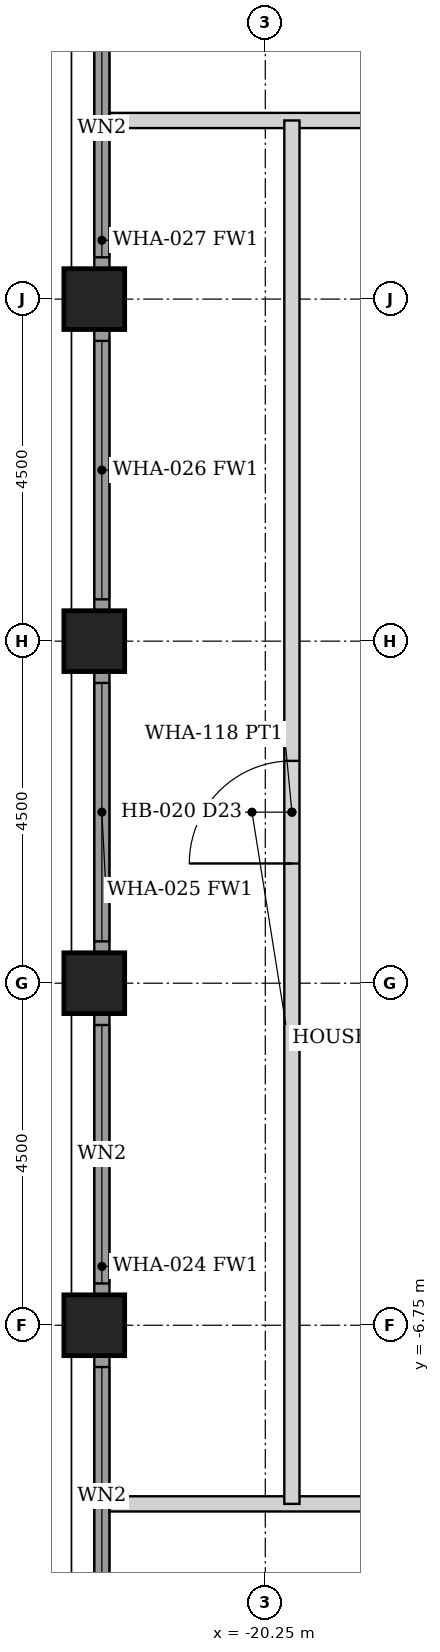
"""IFC4 building model, lengths in metres.
Left out: names, types, materials, properties, quantities, classifications, styles, units other than length and angle.
Written with IfcOpenShell. Run it as: python <this file> out.ifc"""

import sys

from ifc_helpers import new_model, si_unit, direction, frame, frame_2d, origin, origin_2d, place, context, subcontext, project, spatial, rectangle, hollow_rectangle, extrude, element, fill, save


model = new_model("IFC4")
c1 = context("Model", 3, precision=1e-05, world=origin(), true_north=direction((0.0, 1.0)))
c2 = subcontext(c1, "Body", "Model", "MODEL_VIEW")
j1 = project(units=[si_unit("LENGTHUNIT", "METRE"), si_unit("PLANEANGLEUNIT", "RADIAN")], contexts=[c1])
p1 = place(None, origin())
s1 = spatial("IfcSite", under=j1, at=p1, CompositionType="ELEMENT")
p2 = place(p1, origin())
s2 = spatial("IfcBuilding", under=s1, at=p2, CompositionType="ELEMENT")
p3 = place(p2, frame((0.0, 0.0, 129.2)))
s3 = spatial("IfcBuildingStorey", under=s2, at=p3, CompositionType="ELEMENT", Elevation=129.2)
for number, where, z_axis, x_axis in (
    (1, (-22.5, -6.75, 0.0), (0.0, 0.0, 1.0), (1.0, 0.0, 0.0)),
    (2, (-22.5, -2.25, 0.0), (0.0, 0.0, 1.0), (1.0, 0.0, 0.0)),
    (3, (-22.5, 2.25, 0.0), (0.0, 0.0, 1.0), (1.0, 0.0, 0.0)),
    (4, (-22.5, 6.75, 0.0), (0.0, 0.0, 1.0), (1.0, 0.0, 0.0)),
):
    element("IfcColumn", number, at=place(p3, frame(where, z_axis=z_axis, x_axis=x_axis)), inside=s3, PredefinedType="COLUMN", context=c2, shape_type="SweptSolid", body=[
        extrude(hollow_rectangle(XDim=0.8, YDim=0.8, WallThickness=0.06, at=origin_2d()), origin(), (0.0, 0.0, 1.0), 3.6),
    ])
p4 = place(p3, frame((-22.4, -10.845, 0.0), z_axis=(0.0, 0.0, 1.0), x_axis=(0.0, 1.0, 0.0)))
e5 = element("IfcWall", 5, at=p4, inside=s3, PredefinedType="SOLIDWALL", context=c2, shape_type="SweptSolid", body=[
    extrude(rectangle(XDim=3.69, YDim=0.2, at=frame_2d((1.845, 0.0))), origin(), (0.0, 0.0, 1.0), 2.479),
])
p5 = place(p4, frame((0.145, 0.0, 0.3)))
e6 = element("IfcOpeningElement", 6, at=p5, cuts=e5, PredefinedType="OPENING", context=c2, shape_type="SweptSolid", body=[
    extrude(rectangle(XDim=3.4, YDim=2.029, at=frame_2d((1.7, 1.015))), frame((0.0, 0.11, 0.0), z_axis=(0.0, -1.0, 0.0), x_axis=(1.0, 0.0, 0.0)), (0.0, 0.0, 1.0), 0.22),
])
p6 = place(p3, frame((-22.4, -6.345, 0.0), z_axis=(0.0, 0.0, 1.0), x_axis=(0.0, 1.0, 0.0)))
e7 = element("IfcWall", 7, at=p6, inside=s3, PredefinedType="SOLIDWALL", context=c2, shape_type="SweptSolid", body=[
    extrude(rectangle(XDim=3.69, YDim=0.2, at=frame_2d((1.845, 0.0))), origin(), (0.0, 0.0, 1.0), 2.479),
])
p7 = place(p6, frame((0.145, 0.0, 0.3)))
e8 = element("IfcOpeningElement", 8, at=p7, cuts=e7, PredefinedType="OPENING", context=c2, shape_type="SweptSolid", body=[
    extrude(rectangle(XDim=3.4, YDim=2.029, at=frame_2d((1.7, 1.015))), frame((0.0, 0.11, 0.0), z_axis=(0.0, -1.0, 0.0), x_axis=(1.0, 0.0, 0.0)), (0.0, 0.0, 1.0), 0.22),
])
p8 = place(p3, frame((-22.4, -1.845, 0.0), z_axis=(0.0, 0.0, 1.0), x_axis=(0.0, 1.0, 0.0)))
e9 = element("IfcWall", 9, at=p8, inside=s3, PredefinedType="SOLIDWALL", context=c2, shape_type="SweptSolid", body=[
    extrude(rectangle(XDim=3.69, YDim=0.2, at=frame_2d((1.845, 0.0))), origin(), (0.0, 0.0, 1.0), 2.479),
])
p9 = place(p8, frame((0.145, 0.0, 0.3)))
e10 = element("IfcOpeningElement", 10, at=p9, cuts=e9, PredefinedType="OPENING", context=c2, shape_type="SweptSolid", body=[
    extrude(rectangle(XDim=3.4, YDim=2.029, at=frame_2d((1.7, 1.015))), frame((0.0, 0.11, 0.0), z_axis=(0.0, -1.0, 0.0), x_axis=(1.0, 0.0, 0.0)), (0.0, 0.0, 1.0), 0.22),
])
p10 = place(p3, frame((-22.4, 2.655, 0.0), z_axis=(0.0, 0.0, 1.0), x_axis=(0.0, 1.0, 0.0)))
e11 = element("IfcWall", 11, at=p10, inside=s3, PredefinedType="SOLIDWALL", context=c2, shape_type="SweptSolid", body=[
    extrude(rectangle(XDim=3.69, YDim=0.2, at=frame_2d((1.845, 0.0))), origin(), (0.0, 0.0, 1.0), 2.479),
])
p11 = place(p10, frame((0.145, 0.0, 0.3)))
e12 = element("IfcOpeningElement", 12, at=p11, cuts=e11, PredefinedType="OPENING", context=c2, shape_type="SweptSolid", body=[
    extrude(rectangle(XDim=3.4, YDim=2.029, at=frame_2d((1.7, 1.015))), frame((0.0, 0.11, 0.0), z_axis=(0.0, -1.0, 0.0), x_axis=(1.0, 0.0, 0.0)), (0.0, 0.0, 1.0), 0.22),
])
p12 = place(p3, frame((-22.4, 7.155, 0.0), z_axis=(0.0, 0.0, 1.0), x_axis=(0.0, 1.0, 0.0)))
e13 = element("IfcWall", 13, at=p12, inside=s3, PredefinedType="SOLIDWALL", context=c2, shape_type="SweptSolid", body=[
    extrude(rectangle(XDim=3.69, YDim=0.2, at=frame_2d((1.845, 0.0))), origin(), (0.0, 0.0, 1.0), 2.479),
])
p13 = place(p12, frame((0.145, 0.0, 0.3)))
e14 = element("IfcOpeningElement", 14, at=p13, cuts=e13, PredefinedType="OPENING", context=c2, shape_type="SweptSolid", body=[
    extrude(rectangle(XDim=3.4, YDim=2.029, at=frame_2d((1.7, 1.015))), frame((0.0, 0.11, 0.0), z_axis=(0.0, -1.0, 0.0), x_axis=(1.0, 0.0, 0.0)), (0.0, 0.0, 1.0), 0.22),
])
p14 = place(p3, frame((-22.3, 9.1, 0.0), z_axis=(0.0, 0.0, 1.0), x_axis=(1.0, 0.0, 0.0)))
e15 = element("IfcWall", 15, at=p14, inside=s3, PredefinedType="PARTITIONING", context=c2, shape_type="SweptSolid", body=[
    extrude(rectangle(XDim=44.6, YDim=0.2, at=frame_2d((22.3, 0.0))), origin(), (0.0, 0.0, 1.0), 2.473),
])
p15 = place(p14, frame((6.75, 0.0, 0.0)))
e16 = element("IfcOpeningElement", 16, at=p15, cuts=e15, PredefinedType="OPENING", context=c2, shape_type="SweptSolid", body=[
    extrude(rectangle(XDim=0.9, YDim=2.1, at=frame_2d((0.45, 1.05))), frame((0.0, 0.11, 0.0), z_axis=(0.0, -1.0, 0.0), x_axis=(1.0, 0.0, 0.0)), (0.0, 0.0, 1.0), 0.22),
])
p16 = place(p14, frame((14.45, 0.0, 0.0)))
e17 = element("IfcOpeningElement", 17, at=p16, cuts=e15, PredefinedType="OPENING", context=c2, shape_type="SweptSolid", body=[
    extrude(rectangle(XDim=0.9, YDim=2.1, at=frame_2d((0.45, 1.05))), frame((0.0, 0.11, 0.0), z_axis=(0.0, -1.0, 0.0), x_axis=(1.0, 0.0, 0.0)), (0.0, 0.0, 1.0), 0.22),
])
p17 = place(p14, frame((15.75, 0.0, 0.0)))
e18 = element("IfcOpeningElement", 18, at=p17, cuts=e15, PredefinedType="OPENING", context=c2, shape_type="SweptSolid", body=[
    extrude(rectangle(XDim=0.9, YDim=2.1, at=frame_2d((0.45, 1.05))), frame((0.0, 0.11, 0.0), z_axis=(0.0, -1.0, 0.0), x_axis=(1.0, 0.0, 0.0)), (0.0, 0.0, 1.0), 0.22),
])
p18 = place(p14, frame((32.45, 0.0, 0.0)))
e19 = element("IfcOpeningElement", 19, at=p18, cuts=e15, PredefinedType="OPENING", context=c2, shape_type="SweptSolid", body=[
    extrude(rectangle(XDim=0.9, YDim=2.1, at=frame_2d((0.45, 1.05))), frame((0.0, 0.11, 0.0), z_axis=(0.0, -1.0, 0.0), x_axis=(1.0, 0.0, 0.0)), (0.0, 0.0, 1.0), 0.22),
])
p19 = place(p14, frame((33.75, 0.0, 0.0)))
e20 = element("IfcOpeningElement", 20, at=p19, cuts=e15, PredefinedType="OPENING", context=c2, shape_type="SweptSolid", body=[
    extrude(rectangle(XDim=0.9, YDim=2.1, at=frame_2d((0.45, 1.05))), frame((0.0, 0.11, 0.0), z_axis=(0.0, -1.0, 0.0), x_axis=(1.0, 0.0, 0.0)), (0.0, 0.0, 1.0), 0.22),
])
p20 = place(p14, frame((38.85, 0.0, 0.0)))
e21 = element("IfcOpeningElement", 21, at=p20, cuts=e15, PredefinedType="OPENING", context=c2, shape_type="SweptSolid", body=[
    extrude(rectangle(XDim=0.9, YDim=2.1, at=frame_2d((0.45, 1.05))), frame((0.0, 0.11, 0.0), z_axis=(0.0, -1.0, 0.0), x_axis=(1.0, 0.0, 0.0)), (0.0, 0.0, 1.0), 0.22),
])
p21 = place(p14, frame((4.85, 0.0, 0.0)))
e22 = element("IfcOpeningElement", 22, at=p21, cuts=e15, PredefinedType="OPENING", context=c2, shape_type="SweptSolid", body=[
    extrude(rectangle(XDim=0.9, YDim=2.1, at=frame_2d((0.45, 1.05))), frame((0.0, 0.11, 0.0), z_axis=(0.0, -1.0, 0.0), x_axis=(1.0, 0.0, 0.0)), (0.0, 0.0, 1.0), 0.22),
])
p22 = place(p3, frame((-22.3, -9.1, 0.0), z_axis=(0.0, 0.0, 1.0), x_axis=(1.0, 0.0, 0.0)))
e23 = element("IfcWall", 23, at=p22, inside=s3, PredefinedType="PARTITIONING", context=c2, shape_type="SweptSolid", body=[
    extrude(rectangle(XDim=44.6, YDim=0.2, at=frame_2d((22.3, 0.0))), origin(), (0.0, 0.0, 1.0), 2.473),
])
p23 = place(p22, frame((9.95, 0.0, 0.0)))
e24 = element("IfcOpeningElement", 24, at=p23, cuts=e23, PredefinedType="OPENING", context=c2, shape_type="SweptSolid", body=[
    extrude(rectangle(XDim=0.9, YDim=2.1, at=frame_2d((0.45, 1.05))), frame((0.0, 0.11, 0.0), z_axis=(0.0, -1.0, 0.0), x_axis=(1.0, 0.0, 0.0)), (0.0, 0.0, 1.0), 0.22),
])
p24 = place(p22, frame((11.25, 0.0, 0.0)))
e25 = element("IfcOpeningElement", 25, at=p24, cuts=e23, PredefinedType="OPENING", context=c2, shape_type="SweptSolid", body=[
    extrude(rectangle(XDim=0.9, YDim=2.1, at=frame_2d((0.45, 1.05))), frame((0.0, 0.11, 0.0), z_axis=(0.0, -1.0, 0.0), x_axis=(1.0, 0.0, 0.0)), (0.0, 0.0, 1.0), 0.22),
])
p25 = place(p22, frame((27.95, 0.0, 0.0)))
e26 = element("IfcOpeningElement", 26, at=p25, cuts=e23, PredefinedType="OPENING", context=c2, shape_type="SweptSolid", body=[
    extrude(rectangle(XDim=0.9, YDim=2.1, at=frame_2d((0.45, 1.05))), frame((0.0, 0.11, 0.0), z_axis=(0.0, -1.0, 0.0), x_axis=(1.0, 0.0, 0.0)), (0.0, 0.0, 1.0), 0.22),
])
p26 = place(p22, frame((29.25, 0.0, 0.0)))
e27 = element("IfcOpeningElement", 27, at=p26, cuts=e23, PredefinedType="OPENING", context=c2, shape_type="SweptSolid", body=[
    extrude(rectangle(XDim=0.9, YDim=2.1, at=frame_2d((0.45, 1.05))), frame((0.0, 0.11, 0.0), z_axis=(0.0, -1.0, 0.0), x_axis=(1.0, 0.0, 0.0)), (0.0, 0.0, 1.0), 0.22),
])
p27 = place(p22, frame((36.95, 0.0, 0.0)))
e28 = element("IfcOpeningElement", 28, at=p27, cuts=e23, PredefinedType="OPENING", context=c2, shape_type="SweptSolid", body=[
    extrude(rectangle(XDim=0.9, YDim=2.1, at=frame_2d((0.45, 1.05))), frame((0.0, 0.11, 0.0), z_axis=(0.0, -1.0, 0.0), x_axis=(1.0, 0.0, 0.0)), (0.0, 0.0, 1.0), 0.22),
])
p28 = place(p22, frame((38.85, 0.0, 0.0)))
e29 = element("IfcOpeningElement", 29, at=p28, cuts=e23, PredefinedType="OPENING", context=c2, shape_type="SweptSolid", body=[
    extrude(rectangle(XDim=0.9, YDim=2.1, at=frame_2d((0.45, 1.05))), frame((0.0, 0.11, 0.0), z_axis=(0.0, -1.0, 0.0), x_axis=(1.0, 0.0, 0.0)), (0.0, 0.0, 1.0), 0.22),
])
p29 = place(p22, frame((4.85, 0.0, 0.0)))
e30 = element("IfcOpeningElement", 30, at=p29, cuts=e23, PredefinedType="OPENING", context=c2, shape_type="SweptSolid", body=[
    extrude(rectangle(XDim=0.9, YDim=2.1, at=frame_2d((0.45, 1.05))), frame((0.0, 0.11, 0.0), z_axis=(0.0, -1.0, 0.0), x_axis=(1.0, 0.0, 0.0)), (0.0, 0.0, 1.0), 0.22),
])
p30 = place(p3, frame((-19.9, -9.1, 0.0), z_axis=(0.0, 0.0, 1.0), x_axis=(0.0, 1.0, 0.0)))
e31 = element("IfcWall", 31, at=p30, inside=s3, PredefinedType="PARTITIONING", context=c2, shape_type="SweptSolid", body=[
    extrude(rectangle(XDim=18.2, YDim=0.2, at=frame_2d((9.1, 0.0))), origin(), (0.0, 0.0, 1.0), 2.473),
])
p31 = place(p30, frame((8.425, 0.0, 0.0)))
e32 = element("IfcOpeningElement", 32, at=p31, cuts=e31, PredefinedType="OPENING", context=c2, shape_type="SweptSolid", body=[
    extrude(rectangle(XDim=1.35, YDim=2.1, at=frame_2d((0.675, 1.05))), frame((0.0, 0.11, 0.0), z_axis=(0.0, -1.0, 0.0), x_axis=(1.0, 0.0, 0.0)), (0.0, 0.0, 1.0), 0.22),
])
p32 = place(p5, origin())
e33 = element("IfcWindow", 33, at=p32, inside=s3, PartitioningType="SINGLE_PANEL", PredefinedType="WINDOW", context=c2, shape_type="SweptSolid", body=[
    extrude(rectangle(XDim=3.4, YDim=2.029, at=frame_2d((1.7, 1.015))), frame((0.0, 0.03, 0.0), z_axis=(0.0, -1.0, 0.0), x_axis=(1.0, 0.0, 0.0)), (0.0, 0.0, 1.0), 0.06),
])
fill(e6, e33)
p33 = place(p7, origin())
e34 = element("IfcWindow", 34, at=p33, inside=s3, PartitioningType="SINGLE_PANEL", PredefinedType="WINDOW", context=c2, shape_type="SweptSolid", body=[
    extrude(rectangle(XDim=3.4, YDim=2.029, at=frame_2d((1.7, 1.015))), frame((0.0, 0.03, 0.0), z_axis=(0.0, -1.0, 0.0), x_axis=(1.0, 0.0, 0.0)), (0.0, 0.0, 1.0), 0.06),
])
fill(e8, e34)
p34 = place(p9, origin())
e35 = element("IfcWindow", 35, at=p34, inside=s3, PartitioningType="SINGLE_PANEL", PredefinedType="WINDOW", context=c2, shape_type="SweptSolid", body=[
    extrude(rectangle(XDim=3.4, YDim=2.029, at=frame_2d((1.7, 1.015))), frame((0.0, 0.03, 0.0), z_axis=(0.0, -1.0, 0.0), x_axis=(1.0, 0.0, 0.0)), (0.0, 0.0, 1.0), 0.06),
])
fill(e10, e35)
p35 = place(p11, origin())
e36 = element("IfcWindow", 36, at=p35, inside=s3, PartitioningType="SINGLE_PANEL", PredefinedType="WINDOW", context=c2, shape_type="SweptSolid", body=[
    extrude(rectangle(XDim=3.4, YDim=2.029, at=frame_2d((1.7, 1.015))), frame((0.0, 0.03, 0.0), z_axis=(0.0, -1.0, 0.0), x_axis=(1.0, 0.0, 0.0)), (0.0, 0.0, 1.0), 0.06),
])
fill(e12, e36)
p36 = place(p13, origin())
e37 = element("IfcWindow", 37, at=p36, inside=s3, PartitioningType="SINGLE_PANEL", PredefinedType="WINDOW", context=c2, shape_type="SweptSolid", body=[
    extrude(rectangle(XDim=3.4, YDim=2.029, at=frame_2d((1.7, 1.015))), frame((0.0, 0.03, 0.0), z_axis=(0.0, -1.0, 0.0), x_axis=(1.0, 0.0, 0.0)), (0.0, 0.0, 1.0), 0.06),
])
fill(e14, e37)
p37 = place(p31, origin())
e38 = element("IfcDoor", 38, at=p37, inside=s3, OperationType="SINGLE_SWING_LEFT", PredefinedType="DOOR", context=c2, shape_type="SweptSolid", body=[
    extrude(rectangle(XDim=1.35, YDim=2.1, at=frame_2d((0.675, 1.05))), frame((0.0, 0.025, 0.0), z_axis=(0.0, -1.0, 0.0), x_axis=(1.0, 0.0, 0.0)), (0.0, 0.0, 1.0), 0.05),
])
fill(e32, e38)
save(model, sys.argv[1])
